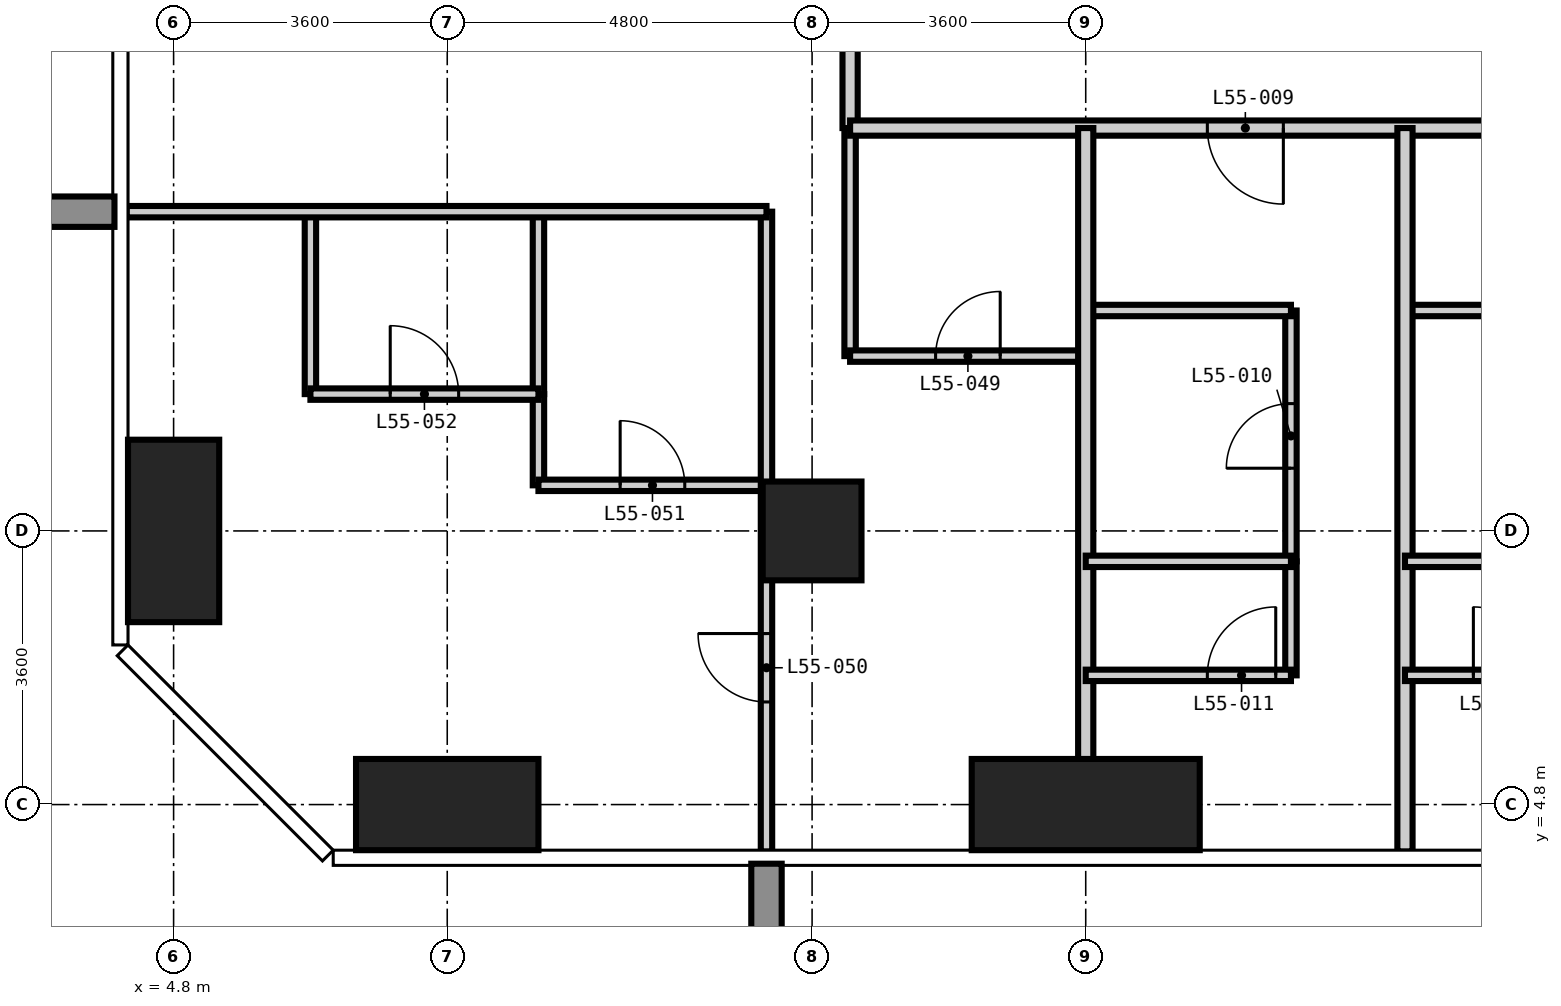
"""IFC4 building model, lengths in metres.
Left out: names, types, materials, properties, quantities, classifications, styles, units other than length and angle.
Written with IfcOpenShell. Run it as: python <this file> out.ifc"""

import sys

from ifc_helpers import new_model, si_unit, direction, frame, frame_2d, origin, origin_2d, place, context, subcontext, project, spatial, rectangle, extrude, element, fill, save


model = new_model("IFC4")
c1 = context("Model", 3, precision=1e-05, world=origin(), true_north=direction((0.0, 1.0)))
c2 = subcontext(c1, "Body", "Model", "MODEL_VIEW")
j1 = project(units=[si_unit("LENGTHUNIT", "METRE"), si_unit("PLANEANGLEUNIT", "RADIAN")], contexts=[c1])
p1 = place(None, origin())
s1 = spatial("IfcSite", under=j1, at=p1, CompositionType="ELEMENT")
p2 = place(p1, origin())
s2 = spatial("IfcBuilding", under=s1, at=p2, CompositionType="ELEMENT")
p3 = place(p2, frame((0.0, 0.0, 213.0)))
s3 = spatial("IfcBuildingStorey", under=s2, at=p3, CompositionType="ELEMENT", Elevation=213.0)
p4 = place(p3, frame((4.8, 8.4, -0.35), z_axis=(0.0, 0.0, 1.0), x_axis=(1.0, 0.0, 0.0)))
e1 = element("IfcColumn", 1, at=p4, inside=s3, PredefinedType="COLUMN", context=c2, shape_type="SweptSolid", body=[
    extrude(rectangle(XDim=1.2, YDim=2.4, at=origin_2d()), origin(), (0.0, 0.0, 1.0), 3.6),
])
p5 = place(p3, frame((8.4, 4.8, -0.35), z_axis=(0.0, 0.0, 1.0), x_axis=(1.0, 0.0, 0.0)))
e2 = element("IfcColumn", 2, at=p5, inside=s3, PredefinedType="COLUMN", context=c2, shape_type="SweptSolid", body=[
    extrude(rectangle(XDim=2.4, YDim=1.2, at=origin_2d()), origin(), (0.0, 0.0, 1.0), 3.6),
])
p6 = place(p3, frame((13.2, 8.4, -0.35), z_axis=(0.0, 0.0, 1.0), x_axis=(1.0, 0.0, 0.0)))
e3 = element("IfcColumn", 3, at=p6, inside=s3, PredefinedType="COLUMN", context=c2, shape_type="SweptSolid", body=[
    extrude(rectangle(XDim=1.3, YDim=1.3, at=origin_2d()), origin(), (0.0, 0.0, 1.0), 3.6),
])
p7 = place(p3, frame((16.8, 4.8, -0.35), z_axis=(0.0, 0.0, 1.0), x_axis=(1.0, 0.0, 0.0)))
e4 = element("IfcColumn", 4, at=p7, inside=s3, PredefinedType="COLUMN", context=c2, shape_type="SweptSolid", body=[
    extrude(rectangle(XDim=3.0, YDim=1.2, at=origin_2d()), origin(), (0.0, 0.0, 1.0), 3.6),
])
p8 = place(p3, frame((9.6, 9.0, 0.0), z_axis=(0.0, 0.0, 1.0), x_axis=(0.0, 1.0, 0.0)))
e5 = element("IfcWall", 5, at=p8, inside=s3, PredefinedType="PARTITIONING", context=c2, shape_type="SweptSolid", body=[
    extrude(rectangle(XDim=1.2, YDim=0.15, at=frame_2d((0.6, 0.0))), origin(), (0.0, 0.0, 1.0), 3.25),
])
p9 = place(p3, frame((13.7, 10.7, 0.0), z_axis=(0.0, 0.0, 1.0), x_axis=(0.0, 1.0, 0.0)))
e6 = element("IfcWall", 6, at=p9, inside=s3, PredefinedType="PARTITIONING", context=c2, shape_type="SweptSolid", body=[
    extrude(rectangle(XDim=3.0, YDim=0.15, at=frame_2d((1.5, 0.0))), origin(), (0.0, 0.0, 1.0), 3.25),
])
p10 = place(p3, frame((19.5, 8.0, 0.0), z_axis=(0.0, 0.0, 1.0), x_axis=(0.0, 1.0, 0.0)))
e7 = element("IfcWall", 7, at=p10, inside=s3, PredefinedType="PARTITIONING", context=c2, shape_type="SweptSolid", body=[
    extrude(rectangle(XDim=3.3, YDim=0.15, at=frame_2d((1.65, 0.0))), origin(), (0.0, 0.0, 1.0), 3.25),
])
p11 = place(p10, frame((1.225, 0.0, 0.0)))
e8 = element("IfcOpeningElement", 8, at=p11, cuts=e7, PredefinedType="OPENING", context=c2, shape_type="SweptSolid", body=[
    extrude(rectangle(XDim=0.85, YDim=2.1, at=frame_2d((0.425, 1.05))), frame((0.0, 0.085, 0.0), z_axis=(0.0, -1.0, 0.0), x_axis=(1.0, 0.0, 0.0)), (0.0, 0.0, 1.0), 0.17),
])
p12 = place(p3, frame((9.6, 9.0, 0.0), z_axis=(0.0, 0.0, 1.0), x_axis=(1.0, 0.0, 0.0)))
e9 = element("IfcWall", 9, at=p12, inside=s3, PredefinedType="PARTITIONING", context=c2, shape_type="SweptSolid", body=[
    extrude(rectangle(XDim=3.0, YDim=0.15, at=frame_2d((1.5, 0.0))), origin(), (0.0, 0.0, 1.0), 3.25),
])
p13 = place(p12, frame((1.075, 0.0, 0.0)))
e10 = element("IfcOpeningElement", 10, at=p13, cuts=e9, PredefinedType="OPENING", context=c2, shape_type="SweptSolid", body=[
    extrude(rectangle(XDim=0.85, YDim=2.1, at=frame_2d((0.425, 1.05))), frame((0.0, 0.085, 0.0), z_axis=(0.0, -1.0, 0.0), x_axis=(1.0, 0.0, 0.0)), (0.0, 0.0, 1.0), 0.17),
])
p14 = place(p3, frame((13.7, 10.7, 0.0), z_axis=(0.0, 0.0, 1.0), x_axis=(1.0, 0.0, 0.0)))
e11 = element("IfcWall", 11, at=p14, inside=s3, PredefinedType="PARTITIONING", context=c2, shape_type="SweptSolid", body=[
    extrude(rectangle(XDim=3.1, YDim=0.15, at=frame_2d((1.55, 0.0))), origin(), (0.0, 0.0, 1.0), 3.25),
])
p15 = place(p14, frame((1.125, 0.0, 0.0)))
e12 = element("IfcOpeningElement", 12, at=p15, cuts=e11, PredefinedType="OPENING", context=c2, shape_type="SweptSolid", body=[
    extrude(rectangle(XDim=0.85, YDim=2.1, at=frame_2d((0.425, 1.05))), frame((0.0, 0.085, 0.0), z_axis=(0.0, -1.0, 0.0), x_axis=(1.0, 0.0, 0.0)), (0.0, 0.0, 1.0), 0.17),
])
for number, where, z_axis, x_axis in (
    (13, (16.8, 11.3, 0.0), (0.0, 0.0, 1.0), (1.0, 0.0, 0.0)),
    (14, (21.0, 11.3, 0.0), (0.0, 0.0, 1.0), (1.0, 0.0, 0.0)),
):
    element("IfcWall", number, at=place(p3, frame(where, z_axis=z_axis, x_axis=x_axis)), inside=s3, PredefinedType="PARTITIONING", context=c2, shape_type="SweptSolid", body=[
        extrude(rectangle(XDim=2.7, YDim=0.15, at=frame_2d((1.35, 0.0))), origin(), (0.0, 0.0, 1.0), 3.25),
    ])
p16 = place(p3, frame((13.7, 13.7, 0.0), z_axis=(0.0, 0.0, 1.0), x_axis=(0.0, 1.0, 0.0)))
e15 = element("IfcWall", 15, at=p16, inside=s3, PredefinedType="PARTITIONING", context=c2, shape_type="SweptSolid", body=[
    extrude(rectangle(XDim=30.8, YDim=0.2, at=frame_2d((15.4, 0.0))), origin(), (0.0, 0.0, 1.0), 3.25),
])
p17 = place(p16, frame((4.7, 0.0, 0.0)))
e16 = element("IfcOpeningElement", 16, at=p17, cuts=e15, PredefinedType="OPENING", context=c2, shape_type="SweptSolid", body=[
    extrude(rectangle(XDim=1.0, YDim=2.2, at=frame_2d((0.5, 1.1))), frame((0.0, 0.11, 0.0), z_axis=(0.0, -1.0, 0.0), x_axis=(1.0, 0.0, 0.0)), (0.0, 0.0, 1.0), 0.22),
])
p18 = place(p16, frame((12.2, 0.0, 0.0)))
e17 = element("IfcOpeningElement", 17, at=p18, cuts=e15, PredefinedType="OPENING", context=c2, shape_type="SweptSolid", body=[
    extrude(rectangle(XDim=1.0, YDim=2.2, at=frame_2d((0.5, 1.1))), frame((0.0, 0.11, 0.0), z_axis=(0.0, -1.0, 0.0), x_axis=(1.0, 0.0, 0.0)), (0.0, 0.0, 1.0), 0.22),
])
p19 = place(p16, frame((18.2, 0.0, 0.0)))
e18 = element("IfcOpeningElement", 18, at=p19, cuts=e15, PredefinedType="OPENING", context=c2, shape_type="SweptSolid", body=[
    extrude(rectangle(XDim=1.0, YDim=2.2, at=frame_2d((0.5, 1.1))), frame((0.0, 0.11, 0.0), z_axis=(0.0, -1.0, 0.0), x_axis=(1.0, 0.0, 0.0)), (0.0, 0.0, 1.0), 0.22),
])
p20 = place(p16, frame((25.7, 0.0, 0.0)))
e19 = element("IfcOpeningElement", 19, at=p20, cuts=e15, PredefinedType="OPENING", context=c2, shape_type="SweptSolid", body=[
    extrude(rectangle(XDim=1.0, YDim=2.2, at=frame_2d((0.5, 1.1))), frame((0.0, 0.11, 0.0), z_axis=(0.0, -1.0, 0.0), x_axis=(1.0, 0.0, 0.0)), (0.0, 0.0, 1.0), 0.22),
])
p21 = place(p16, frame((1.05, 0.0, 0.0)))
e20 = element("IfcOpeningElement", 20, at=p21, cuts=e15, PredefinedType="OPENING", context=c2, shape_type="SweptSolid", body=[
    extrude(rectangle(XDim=1.0, YDim=2.2, at=frame_2d((0.5, 1.1))), frame((0.0, 0.11, 0.0), z_axis=(0.0, -1.0, 0.0), x_axis=(1.0, 0.0, 0.0)), (0.0, 0.0, 1.0), 0.22),
])
p22 = place(p16, frame((29.05, 0.0, 0.0)))
e21 = element("IfcOpeningElement", 21, at=p22, cuts=e15, PredefinedType="OPENING", context=c2, shape_type="SweptSolid", body=[
    extrude(rectangle(XDim=1.0, YDim=2.2, at=frame_2d((0.5, 1.1))), frame((0.0, 0.11, 0.0), z_axis=(0.0, -1.0, 0.0), x_axis=(1.0, 0.0, 0.0)), (0.0, 0.0, 1.0), 0.22),
])
p23 = place(p3, frame((45.7, 13.7, 0.0), z_axis=(0.0, 0.0, 1.0), x_axis=(-1.0, 0.0, 0.0)))
e22 = element("IfcWall", 22, at=p23, inside=s3, PredefinedType="PARTITIONING", context=c2, shape_type="SweptSolid", body=[
    extrude(rectangle(XDim=32.0, YDim=0.2, at=frame_2d((16.0, 0.0))), origin(), (0.0, 0.0, 1.0), 3.25),
])
p24 = place(p23, frame((26.3, 0.0, 0.0)))
e23 = element("IfcOpeningElement", 23, at=p24, cuts=e22, PredefinedType="OPENING", context=c2, shape_type="SweptSolid", body=[
    extrude(rectangle(XDim=1.0, YDim=2.2, at=frame_2d((0.5, 1.1))), frame((0.0, 0.11, 0.0), z_axis=(0.0, -1.0, 0.0), x_axis=(1.0, 0.0, 0.0)), (0.0, 0.0, 1.0), 0.22),
])
p25 = place(p23, frame((22.1, 0.0, 0.0)))
e24 = element("IfcOpeningElement", 24, at=p25, cuts=e22, PredefinedType="OPENING", context=c2, shape_type="SweptSolid", body=[
    extrude(rectangle(XDim=1.0, YDim=2.2, at=frame_2d((0.5, 1.1))), frame((0.0, 0.11, 0.0), z_axis=(0.0, -1.0, 0.0), x_axis=(1.0, 0.0, 0.0)), (0.0, 0.0, 1.0), 0.22),
])
p26 = place(p23, frame((17.9, 0.0, 0.0)))
e25 = element("IfcOpeningElement", 25, at=p26, cuts=e22, PredefinedType="OPENING", context=c2, shape_type="SweptSolid", body=[
    extrude(rectangle(XDim=1.0, YDim=2.2, at=frame_2d((0.5, 1.1))), frame((0.0, 0.11, 0.0), z_axis=(0.0, -1.0, 0.0), x_axis=(1.0, 0.0, 0.0)), (0.0, 0.0, 1.0), 0.22),
])
p27 = place(p23, frame((13.7, 0.0, 0.0)))
e26 = element("IfcOpeningElement", 26, at=p27, cuts=e22, PredefinedType="OPENING", context=c2, shape_type="SweptSolid", body=[
    extrude(rectangle(XDim=1.0, YDim=2.2, at=frame_2d((0.5, 1.1))), frame((0.0, 0.11, 0.0), z_axis=(0.0, -1.0, 0.0), x_axis=(1.0, 0.0, 0.0)), (0.0, 0.0, 1.0), 0.22),
])
p28 = place(p23, frame((9.5, 0.0, 0.0)))
e27 = element("IfcOpeningElement", 27, at=p28, cuts=e22, PredefinedType="OPENING", context=c2, shape_type="SweptSolid", body=[
    extrude(rectangle(XDim=1.0, YDim=2.2, at=frame_2d((0.5, 1.1))), frame((0.0, 0.11, 0.0), z_axis=(0.0, -1.0, 0.0), x_axis=(1.0, 0.0, 0.0)), (0.0, 0.0, 1.0), 0.22),
])
p29 = place(p23, frame((5.3, 0.0, 0.0)))
e28 = element("IfcOpeningElement", 28, at=p29, cuts=e22, PredefinedType="OPENING", context=c2, shape_type="SweptSolid", body=[
    extrude(rectangle(XDim=1.0, YDim=2.2, at=frame_2d((0.5, 1.1))), frame((0.0, 0.11, 0.0), z_axis=(0.0, -1.0, 0.0), x_axis=(1.0, 0.0, 0.0)), (0.0, 0.0, 1.0), 0.22),
])
for number, where, z_axis, x_axis in (
    (29, (16.8, 4.182, 0.0), (0.0, 0.0, 1.0), (0.0, 1.0, 0.0)),
    (30, (21.0, 4.182, 0.0), (0.0, 0.0, 1.0), (0.0, 1.0, 0.0)),
):
    element("IfcWall", number, at=place(p3, frame(where, z_axis=z_axis, x_axis=x_axis)), inside=s3, PredefinedType="PARTITIONING", context=c2, shape_type="SweptSolid", body=[
        extrude(rectangle(XDim=9.518, YDim=0.2, at=frame_2d((4.759, 0.0))), origin(), (0.0, 0.0, 1.0), 3.25),
    ])
for number, where, z_axis, x_axis in (
    (31, (6.6, 10.2, 0.0), (0.0, 0.0, 1.0), (0.0, 1.0, 0.0)),
    (32, (9.6, 10.2, 0.0), (0.0, 0.0, 1.0), (0.0, 1.0, 0.0)),
):
    element("IfcWall", number, at=place(p3, frame(where, z_axis=z_axis, x_axis=x_axis)), inside=s3, PredefinedType="PARTITIONING", context=c2, shape_type="SweptSolid", body=[
        extrude(rectangle(XDim=2.4, YDim=0.15, at=frame_2d((1.2, 0.0))), origin(), (0.0, 0.0, 1.0), 3.25),
    ])
p30 = place(p3, frame((12.6, 4.182, 0.0), z_axis=(0.0, 0.0, 1.0), x_axis=(0.0, 1.0, 0.0)))
e33 = element("IfcWall", 33, at=p30, inside=s3, PredefinedType="PARTITIONING", context=c2, shape_type="SweptSolid", body=[
    extrude(rectangle(XDim=8.418, YDim=0.15, at=frame_2d((4.209, 0.0))), origin(), (0.0, 0.0, 1.0), 3.25),
])
p31 = place(p30, frame((1.968, 0.0, 0.0)))
e34 = element("IfcOpeningElement", 34, at=p31, cuts=e33, PredefinedType="OPENING", context=c2, shape_type="SweptSolid", body=[
    extrude(rectangle(XDim=0.9, YDim=2.1, at=frame_2d((0.45, 1.05))), frame((0.0, 0.085, 0.0), z_axis=(0.0, -1.0, 0.0), x_axis=(1.0, 0.0, 0.0)), (0.0, 0.0, 1.0), 0.17),
])
p32 = place(p3, frame((19.5, 6.5, 0.0), z_axis=(0.0, 0.0, 1.0), x_axis=(0.0, 1.0, 0.0)))
e35 = element("IfcWall", 35, at=p32, inside=s3, PredefinedType="PARTITIONING", context=c2, shape_type="SweptSolid", body=[
    extrude(rectangle(XDim=1.5, YDim=0.15, at=frame_2d((0.75, 0.0))), origin(), (0.0, 0.0, 1.0), 3.25),
])
p33 = place(p3, frame((16.8, 6.5, 0.0), z_axis=(0.0, 0.0, 1.0), x_axis=(1.0, 0.0, 0.0)))
e36 = element("IfcWall", 36, at=p33, inside=s3, PredefinedType="PARTITIONING", context=c2, shape_type="SweptSolid", body=[
    extrude(rectangle(XDim=2.7, YDim=0.15, at=frame_2d((1.35, 0.0))), origin(), (0.0, 0.0, 1.0), 3.25),
])
p34 = place(p33, frame((1.6, 0.0, 0.0)))
e37 = element("IfcOpeningElement", 37, at=p34, cuts=e36, PredefinedType="OPENING", context=c2, shape_type="SweptSolid", body=[
    extrude(rectangle(XDim=0.9, YDim=2.1, at=frame_2d((0.45, 1.05))), frame((0.0, 0.085, 0.0), z_axis=(0.0, -1.0, 0.0), x_axis=(1.0, 0.0, 0.0)), (0.0, 0.0, 1.0), 0.17),
])
p35 = place(p3, frame((21.0, 6.5, 0.0), z_axis=(0.0, 0.0, 1.0), x_axis=(1.0, 0.0, 0.0)))
e38 = element("IfcWall", 38, at=p35, inside=s3, PredefinedType="PARTITIONING", context=c2, shape_type="SweptSolid", body=[
    extrude(rectangle(XDim=2.7, YDim=0.15, at=frame_2d((1.35, 0.0))), origin(), (0.0, 0.0, 1.0), 3.25),
])
p36 = place(p35, frame((0.9, 0.0, 0.0)))
e39 = element("IfcOpeningElement", 39, at=p36, cuts=e38, PredefinedType="OPENING", context=c2, shape_type="SweptSolid", body=[
    extrude(rectangle(XDim=0.9, YDim=2.1, at=frame_2d((0.45, 1.05))), frame((0.0, 0.085, 0.0), z_axis=(0.0, -1.0, 0.0), x_axis=(1.0, 0.0, 0.0)), (0.0, 0.0, 1.0), 0.17),
])
for number, where, z_axis, x_axis in (
    (40, (16.8, 8.0, 0.0), (0.0, 0.0, 1.0), (1.0, 0.0, 0.0)),
    (41, (21.0, 8.0, 0.0), (0.0, 0.0, 1.0), (1.0, 0.0, 0.0)),
):
    element("IfcWall", number, at=place(p3, frame(where, z_axis=z_axis, x_axis=x_axis)), inside=s3, PredefinedType="PARTITIONING", context=c2, shape_type="SweptSolid", body=[
        extrude(rectangle(XDim=2.7, YDim=0.15, at=frame_2d((1.35, 0.0))), origin(), (0.0, 0.0, 1.0), 3.25),
    ])
p37 = place(p3, frame((6.6, 10.2, 0.0), z_axis=(0.0, 0.0, 1.0), x_axis=(1.0, 0.0, 0.0)))
e42 = element("IfcWall", 42, at=p37, inside=s3, PredefinedType="PARTITIONING", context=c2, shape_type="SweptSolid", body=[
    extrude(rectangle(XDim=3.0, YDim=0.15, at=frame_2d((1.5, 0.0))), origin(), (0.0, 0.0, 1.0), 3.25),
])
p38 = place(p37, frame((1.05, 0.0, 0.0)))
e43 = element("IfcOpeningElement", 43, at=p38, cuts=e42, PredefinedType="OPENING", context=c2, shape_type="SweptSolid", body=[
    extrude(rectangle(XDim=0.9, YDim=2.1, at=frame_2d((0.45, 1.05))), frame((0.0, 0.085, 0.0), z_axis=(0.0, -1.0, 0.0), x_axis=(1.0, 0.0, 0.0)), (0.0, 0.0, 1.0), 0.17),
])
p39 = place(p3, frame((4.182, 12.6, 0.0), z_axis=(0.0, 0.0, 1.0), x_axis=(1.0, 0.0, 0.0)))
e44 = element("IfcWall", 44, at=p39, inside=s3, PredefinedType="PARTITIONING", context=c2, shape_type="SweptSolid", body=[
    extrude(rectangle(XDim=8.418, YDim=0.15, at=frame_2d((4.209, 0.0))), origin(), (0.0, 0.0, 1.0), 3.25),
])
p40 = place(p24, origin())
e45 = element("IfcDoor", 45, at=p40, inside=s3, OperationType="SINGLE_SWING_LEFT", PredefinedType="DOOR", context=c2, shape_type="SweptSolid", body=[
    extrude(rectangle(XDim=1.0, YDim=2.2, at=frame_2d((0.5, 1.1))), frame((0.0, 0.025, 0.0), z_axis=(0.0, -1.0, 0.0), x_axis=(1.0, 0.0, 0.0)), (0.0, 0.0, 1.0), 0.05),
])
fill(e23, e45)
p41 = place(p11, origin())
e46 = element("IfcDoor", 46, at=p41, inside=s3, OperationType="SINGLE_SWING_LEFT", PredefinedType="DOOR", context=c2, shape_type="SweptSolid", body=[
    extrude(rectangle(XDim=0.85, YDim=2.1, at=frame_2d((0.425, 1.05))), frame((0.0, 0.025, 0.0), z_axis=(0.0, -1.0, 0.0), x_axis=(1.0, 0.0, 0.0)), (0.0, 0.0, 1.0), 0.05),
])
fill(e8, e46)
p42 = place(p34, origin())
e47 = element("IfcDoor", 47, at=p42, inside=s3, OperationType="SINGLE_SWING_RIGHT", PredefinedType="DOOR", context=c2, shape_type="SweptSolid", body=[
    extrude(rectangle(XDim=0.9, YDim=2.1, at=frame_2d((0.45, 1.05))), frame((0.0, 0.025, 0.0), z_axis=(0.0, -1.0, 0.0), x_axis=(1.0, 0.0, 0.0)), (0.0, 0.0, 1.0), 0.05),
])
fill(e37, e47)
p43 = place(p36, origin())
e48 = element("IfcDoor", 48, at=p43, inside=s3, OperationType="SINGLE_SWING_LEFT", PredefinedType="DOOR", context=c2, shape_type="SweptSolid", body=[
    extrude(rectangle(XDim=0.9, YDim=2.1, at=frame_2d((0.45, 1.05))), frame((0.0, 0.025, 0.0), z_axis=(0.0, -1.0, 0.0), x_axis=(1.0, 0.0, 0.0)), (0.0, 0.0, 1.0), 0.05),
])
fill(e39, e48)
p44 = place(p15, origin())
e49 = element("IfcDoor", 49, at=p44, inside=s3, OperationType="SINGLE_SWING_RIGHT", PredefinedType="DOOR", context=c2, shape_type="SweptSolid", body=[
    extrude(rectangle(XDim=0.85, YDim=2.1, at=frame_2d((0.425, 1.05))), frame((0.0, 0.025, 0.0), z_axis=(0.0, -1.0, 0.0), x_axis=(1.0, 0.0, 0.0)), (0.0, 0.0, 1.0), 0.05),
])
fill(e12, e49)
p45 = place(p31, origin())
e50 = element("IfcDoor", 50, at=p45, inside=s3, OperationType="SINGLE_SWING_RIGHT", PredefinedType="DOOR", context=c2, shape_type="SweptSolid", body=[
    extrude(rectangle(XDim=0.9, YDim=2.1, at=frame_2d((0.45, 1.05))), frame((0.0, 0.025, 0.0), z_axis=(0.0, -1.0, 0.0), x_axis=(1.0, 0.0, 0.0)), (0.0, 0.0, 1.0), 0.05),
])
fill(e34, e50)
p46 = place(p13, origin())
e51 = element("IfcDoor", 51, at=p46, inside=s3, OperationType="SINGLE_SWING_LEFT", PredefinedType="DOOR", context=c2, shape_type="SweptSolid", body=[
    extrude(rectangle(XDim=0.85, YDim=2.1, at=frame_2d((0.425, 1.05))), frame((0.0, 0.025, 0.0), z_axis=(0.0, -1.0, 0.0), x_axis=(1.0, 0.0, 0.0)), (0.0, 0.0, 1.0), 0.05),
])
fill(e10, e51)
p47 = place(p38, origin())
e52 = element("IfcDoor", 52, at=p47, inside=s3, OperationType="SINGLE_SWING_LEFT", PredefinedType="DOOR", context=c2, shape_type="SweptSolid", body=[
    extrude(rectangle(XDim=0.9, YDim=2.1, at=frame_2d((0.45, 1.05))), frame((0.0, 0.025, 0.0), z_axis=(0.0, -1.0, 0.0), x_axis=(1.0, 0.0, 0.0)), (0.0, 0.0, 1.0), 0.05),
])
fill(e43, e52)
save(model, sys.argv[1])
